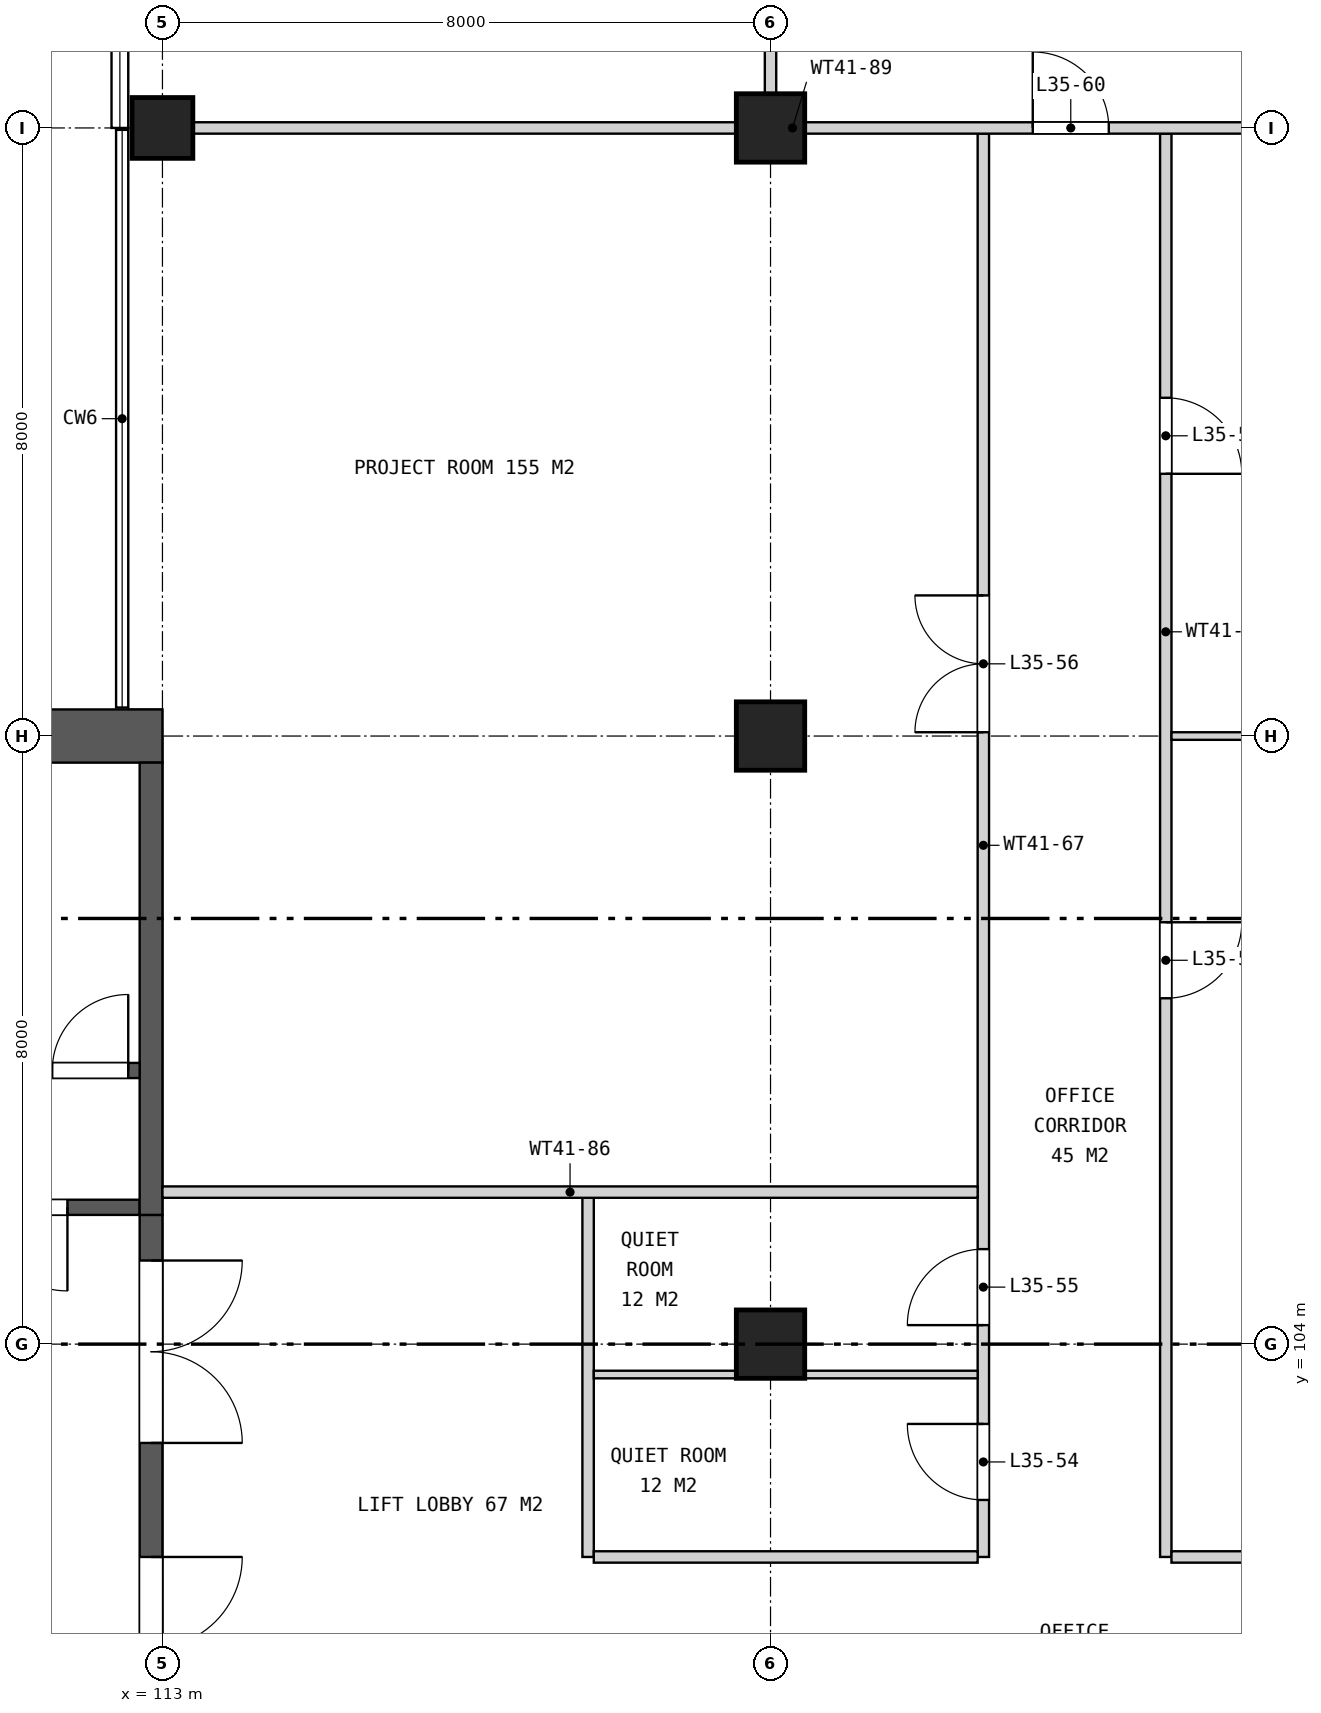
"""IFC4 building model, lengths in metres.
Left out: names, types, materials, properties, quantities, classifications, styles, units other than length and angle.
Written with IfcOpenShell. Run it as: python <this file> out.ifc"""

import sys

from ifc_helpers import new_model, si_unit, direction, frame, frame_2d, origin, origin_2d, place, context, subcontext, project, spatial, rectangle, extrude, element, fill, save


model = new_model("IFC4")
c1 = context("Model", 3, precision=1e-05, world=origin(), true_north=direction((0.0, 1.0)))
c2 = subcontext(c1, "Body", "Model", "MODEL_VIEW")
j1 = project(units=[si_unit("LENGTHUNIT", "METRE"), si_unit("PLANEANGLEUNIT", "RADIAN")], contexts=[c1])
p1 = place(None, origin())
s1 = spatial("IfcSite", under=j1, at=p1, CompositionType="ELEMENT")
p2 = place(p1, origin())
s2 = spatial("IfcBuilding", under=s1, at=p2, CompositionType="ELEMENT")
p3 = place(p2, frame((0.0, 0.0, 167.3)))
s3 = spatial("IfcBuildingStorey", under=s2, at=p3, CompositionType="ELEMENT", Elevation=167.3)
p4 = place(p3, frame((113.0, 120.0, 0.0), z_axis=(0.0, 0.0, 1.0), x_axis=(1.0, 0.0, 0.0)))
e1 = element("IfcColumn", 1, at=p4, inside=s3, PredefinedType="COLUMN", context=c2, shape_type="SweptSolid", body=[
    extrude(rectangle(XDim=0.8, YDim=0.8, at=origin_2d()), origin(), (0.0, 0.0, 1.0), 4.2),
])
for number, where, z_axis, x_axis in (
    (2, (121.0, 104.0, 0.0), (0.0, 0.0, 1.0), (1.0, 0.0, 0.0)),
    (3, (121.0, 112.0, 0.0), (0.0, 0.0, 1.0), (1.0, 0.0, 0.0)),
    (4, (121.0, 120.0, 0.0), (0.0, 0.0, 1.0), (1.0, 0.0, 0.0)),
):
    element("IfcColumn", number, at=place(p3, frame(where, z_axis=z_axis, x_axis=x_axis)), inside=s3, PredefinedType="COLUMN", context=c2, shape_type="SweptSolid", body=[
        extrude(rectangle(XDim=0.9, YDim=0.9, at=origin_2d()), origin(), (0.0, 0.0, 1.0), 4.2),
    ])
p5 = place(p3, frame((113.0, 112.0, 0.0), z_axis=(0.0, 0.0, 1.0), x_axis=(-1.0, 0.0, 0.0)))
e5 = element("IfcWall", 5, at=p5, inside=s3, PredefinedType="SHEAR", context=c2, shape_type="SweptSolid", body=[
    extrude(rectangle(XDim=7.1, YDim=0.7, at=frame_2d((3.55, 0.0))), origin(), (0.0, 0.0, 1.0), 4.2),
])
p6 = place(p3, frame((112.85, 105.7, 0.0), z_axis=(0.0, 0.0, 1.0), x_axis=(0.0, -1.0, 0.0)))
e6 = element("IfcWall", 6, at=p6, inside=s3, PredefinedType="SHEAR", context=c2, shape_type="SweptSolid", body=[
    extrude(rectangle(XDim=11.4, YDim=0.3, at=frame_2d((5.7, 0.0))), origin(), (0.0, 0.0, 1.0), 4.2),
])
p7 = place(p6, frame((0.6, 0.0, 0.0)))
e7 = element("IfcOpeningElement", 7, at=p7, cuts=e6, PredefinedType="OPENING", context=c2, shape_type="SweptSolid", body=[
    extrude(rectangle(XDim=2.4, YDim=2.4, at=frame_2d((1.2, 1.2))), frame((0.0, 0.16, 0.0), z_axis=(0.0, -1.0, 0.0), x_axis=(1.0, 0.0, 0.0)), (0.0, 0.0, 1.0), 0.32),
])
p8 = place(p6, frame((4.5, 0.0, 0.0)))
e8 = element("IfcOpeningElement", 8, at=p8, cuts=e6, PredefinedType="OPENING", context=c2, shape_type="SweptSolid", body=[
    extrude(rectangle(XDim=2.4, YDim=2.4, at=frame_2d((1.2, 1.2))), frame((0.0, 0.16, 0.0), z_axis=(0.0, -1.0, 0.0), x_axis=(1.0, 0.0, 0.0)), (0.0, 0.0, 1.0), 0.32),
])
p9 = place(p6, frame((8.4, 0.0, 0.0)))
e9 = element("IfcOpeningElement", 9, at=p9, cuts=e6, PredefinedType="OPENING", context=c2, shape_type="SweptSolid", body=[
    extrude(rectangle(XDim=2.4, YDim=2.4, at=frame_2d((1.2, 1.2))), frame((0.0, 0.16, 0.0), z_axis=(0.0, -1.0, 0.0), x_axis=(1.0, 0.0, 0.0)), (0.0, 0.0, 1.0), 0.32),
])
p10 = place(p3, frame((112.7, 105.8, 0.0), z_axis=(0.0, 0.0, 1.0), x_axis=(-1.0, 0.0, 0.0)))
e10 = element("IfcWall", 10, at=p10, inside=s3, PredefinedType="SHEAR", context=c2, shape_type="SweptSolid", body=[
    extrude(rectangle(XDim=15.35, YDim=0.2, at=frame_2d((7.675, 0.0))), origin(), (0.0, 0.0, 1.0), 4.2),
])
p11 = place(p10, frame((0.95, 0.0, 0.0)))
e11 = element("IfcOpeningElement", 11, at=p11, cuts=e10, PredefinedType="OPENING", context=c2, shape_type="SweptSolid", body=[
    extrude(rectangle(XDim=1.1, YDim=2.1, at=frame_2d((0.55, 1.05))), frame((0.0, 0.11, 0.0), z_axis=(0.0, -1.0, 0.0), x_axis=(1.0, 0.0, 0.0)), (0.0, 0.0, 1.0), 0.22),
])
p12 = place(p3, frame((112.85, 111.65, 0.0), z_axis=(0.0, 0.0, 1.0), x_axis=(0.0, -1.0, 0.0)))
e12 = element("IfcWall", 12, at=p12, inside=s3, PredefinedType="SHEAR", context=c2, shape_type="SweptSolid", body=[
    extrude(rectangle(XDim=5.95, YDim=0.3, at=frame_2d((2.975, 0.0))), origin(), (0.0, 0.0, 1.0), 4.2),
])
p13 = place(p3, frame((112.7, 107.6, 0.0), z_axis=(0.0, 0.0, 1.0), x_axis=(-1.0, 0.0, 0.0)))
e13 = element("IfcWall", 13, at=p13, inside=s3, PredefinedType="SHEAR", context=c2, shape_type="SweptSolid", body=[
    extrude(rectangle(XDim=6.8, YDim=0.2, at=frame_2d((3.4, 0.0))), origin(), (0.0, 0.0, 1.0), 4.2),
])
p14 = place(p13, frame((0.15, 0.0, 0.0)))
e14 = element("IfcOpeningElement", 14, at=p14, cuts=e13, PredefinedType="OPENING", context=c2, shape_type="SweptSolid", body=[
    extrude(rectangle(XDim=1.0, YDim=2.1, at=frame_2d((0.5, 1.05))), frame((0.0, 0.11, 0.0), z_axis=(0.0, -1.0, 0.0), x_axis=(1.0, 0.0, 0.0)), (0.0, 0.0, 1.0), 0.22),
])
p15 = place(p3, frame((118.6, 101.2, 0.0), z_axis=(0.0, 0.0, 1.0), x_axis=(0.0, 1.0, 0.0)))
e15 = element("IfcWall", 15, at=p15, inside=s3, PredefinedType="PARTITIONING", context=c2, shape_type="SweptSolid", body=[
    extrude(rectangle(XDim=4.725, YDim=0.15, at=frame_2d((2.363, 0.0))), origin(), (0.0, 0.0, 1.0), 3.26),
])
p16 = place(p3, frame((121.0, 120.075, 0.0), z_axis=(0.0, 0.0, 1.0), x_axis=(0.0, 1.0, 0.0)))
e16 = element("IfcWall", 16, at=p16, inside=s3, PredefinedType="PARTITIONING", context=c2, shape_type="SweptSolid", body=[
    extrude(rectangle(XDim=8.295, YDim=0.15, at=frame_2d((4.147, 0.0))), origin(), (0.0, 0.0, 1.0), 3.26),
])
p17 = place(p16, frame((3.55, 0.0, 0.0)))
e17 = element("IfcOpeningElement", 17, at=p17, cuts=e16, PredefinedType="OPENING", context=c2, shape_type="SweptSolid", body=[
    extrude(rectangle(XDim=0.9, YDim=2.1, at=frame_2d((0.45, 1.05))), frame((0.0, 0.085, 0.0), z_axis=(0.0, -1.0, 0.0), x_axis=(1.0, 0.0, 0.0)), (0.0, 0.0, 1.0), 0.17),
])
p18 = place(p3, frame((123.8, 101.2, 0.0), z_axis=(0.0, 0.0, 1.0), x_axis=(0.0, 1.0, 0.0)))
e18 = element("IfcWall", 18, at=p18, inside=s3, PredefinedType="PARTITIONING", context=c2, shape_type="SweptSolid", body=[
    extrude(rectangle(XDim=18.725, YDim=0.15, at=frame_2d((9.363, 0.0))), origin(), (0.0, 0.0, 1.0), 3.26),
])
p19 = place(p18, frame((0.75, 0.0, 0.0)))
e19 = element("IfcOpeningElement", 19, at=p19, cuts=e18, PredefinedType="OPENING", context=c2, shape_type="SweptSolid", body=[
    extrude(rectangle(XDim=1.0, YDim=2.1, at=frame_2d((0.5, 1.05))), frame((0.0, 0.085, 0.0), z_axis=(0.0, -1.0, 0.0), x_axis=(1.0, 0.0, 0.0)), (0.0, 0.0, 1.0), 0.17),
])
p20 = place(p18, frame((3.05, 0.0, 0.0)))
e20 = element("IfcOpeningElement", 20, at=p20, cuts=e18, PredefinedType="OPENING", context=c2, shape_type="SweptSolid", body=[
    extrude(rectangle(XDim=1.0, YDim=2.1, at=frame_2d((0.5, 1.05))), frame((0.0, 0.085, 0.0), z_axis=(0.0, -1.0, 0.0), x_axis=(1.0, 0.0, 0.0)), (0.0, 0.0, 1.0), 0.17),
])
p21 = place(p18, frame((10.85, 0.0, 0.0)))
e21 = element("IfcOpeningElement", 21, at=p21, cuts=e18, PredefinedType="OPENING", context=c2, shape_type="SweptSolid", body=[
    extrude(rectangle(XDim=1.8, YDim=2.1, at=frame_2d((0.9, 1.05))), frame((0.0, 0.085, 0.0), z_axis=(0.0, -1.0, 0.0), x_axis=(1.0, 0.0, 0.0)), (0.0, 0.0, 1.0), 0.17),
])
p22 = place(p3, frame((126.2, 101.2, 0.0), z_axis=(0.0, 0.0, 1.0), x_axis=(0.0, 1.0, 0.0)))
e22 = element("IfcWall", 22, at=p22, inside=s3, PredefinedType="PARTITIONING", context=c2, shape_type="SweptSolid", body=[
    extrude(rectangle(XDim=18.725, YDim=0.15, at=frame_2d((9.363, 0.0))), origin(), (0.0, 0.0, 1.0), 3.26),
])
p23 = place(p22, frame((7.35, 0.0, 0.0)))
e23 = element("IfcOpeningElement", 23, at=p23, cuts=e22, PredefinedType="OPENING", context=c2, shape_type="SweptSolid", body=[
    extrude(rectangle(XDim=1.0, YDim=2.1, at=frame_2d((0.5, 1.05))), frame((0.0, 0.085, 0.0), z_axis=(0.0, -1.0, 0.0), x_axis=(1.0, 0.0, 0.0)), (0.0, 0.0, 1.0), 0.17),
])
p24 = place(p22, frame((14.25, 0.0, 0.0)))
e24 = element("IfcOpeningElement", 24, at=p24, cuts=e22, PredefinedType="OPENING", context=c2, shape_type="SweptSolid", body=[
    extrude(rectangle(XDim=1.0, YDim=2.1, at=frame_2d((0.5, 1.05))), frame((0.0, 0.085, 0.0), z_axis=(0.0, -1.0, 0.0), x_axis=(1.0, 0.0, 0.0)), (0.0, 0.0, 1.0), 0.17),
])
for number, where, z_axis, x_axis in (
    (25, (118.675, 101.2, 0.0), (0.0, 0.0, 1.0), (1.0, 0.0, 0.0)),
    (26, (126.275, 101.2, 0.0), (0.0, 0.0, 1.0), (1.0, 0.0, 0.0)),
):
    element("IfcWall", number, at=place(p3, frame(where, z_axis=z_axis, x_axis=x_axis)), inside=s3, PredefinedType="PARTITIONING", context=c2, shape_type="SweptSolid", body=[
        extrude(rectangle(XDim=5.05, YDim=0.15, at=frame_2d((2.525, 0.0))), origin(), (0.0, 0.0, 1.0), 3.26),
    ])
p25 = place(p3, frame((118.675, 103.6, 0.0), z_axis=(0.0, 0.0, 1.0), x_axis=(1.0, 0.0, 0.0)))
e27 = element("IfcWall", 27, at=p25, inside=s3, PredefinedType="PARTITIONING", context=c2, shape_type="SweptSolid", body=[
    extrude(rectangle(XDim=5.05, YDim=0.1, at=frame_2d((2.525, 0.0))), origin(), (0.0, 0.0, 1.0), 3.26),
])
p26 = place(p3, frame((113.0, 106.0, 0.0), z_axis=(0.0, 0.0, 1.0), x_axis=(1.0, 0.0, 0.0)))
e28 = element("IfcWall", 28, at=p26, inside=s3, PredefinedType="PARTITIONING", context=c2, shape_type="SweptSolid", body=[
    extrude(rectangle(XDim=10.725, YDim=0.15, at=frame_2d((5.363, 0.0))), origin(), (0.0, 0.0, 1.0), 3.26),
])
p27 = place(p3, frame((126.275, 112.0, 0.0), z_axis=(0.0, 0.0, 1.0), x_axis=(1.0, 0.0, 0.0)))
e29 = element("IfcWall", 29, at=p27, inside=s3, PredefinedType="PARTITIONING", context=c2, shape_type="SweptSolid", body=[
    extrude(rectangle(XDim=10.725, YDim=0.1, at=frame_2d((5.363, 0.0))), origin(), (0.0, 0.0, 1.0), 3.26),
])
p28 = place(p3, frame((112.63, 120.0, 0.0), z_axis=(0.0, 0.0, 1.0), x_axis=(1.0, 0.0, 0.0)))
e30 = element("IfcWall", 30, at=p28, inside=s3, PredefinedType="PARTITIONING", context=c2, shape_type="SweptSolid", body=[
    extrude(rectangle(XDim=24.74, YDim=0.15, at=frame_2d((12.37, 0.0))), origin(), (0.0, 0.0, 1.0), 3.26),
])
p29 = place(p28, frame((11.82, 0.0, 0.0)))
e31 = element("IfcOpeningElement", 31, at=p29, cuts=e30, PredefinedType="OPENING", context=c2, shape_type="SweptSolid", body=[
    extrude(rectangle(XDim=1.0, YDim=2.1, at=frame_2d((0.5, 1.05))), frame((0.0, 0.085, 0.0), z_axis=(0.0, -1.0, 0.0), x_axis=(1.0, 0.0, 0.0)), (0.0, 0.0, 1.0), 0.17),
])
p30 = place(p7, origin())
e32 = element("IfcDoor", 32, at=p30, inside=s3, OperationType="DOUBLE_DOOR_SINGLE_SWING", PredefinedType="DOOR", context=c2, shape_type="SweptSolid", body=[
    extrude(rectangle(XDim=2.4, YDim=2.4, at=frame_2d((1.2, 1.2))), frame((0.0, 0.025, 0.0), z_axis=(0.0, -1.0, 0.0), x_axis=(1.0, 0.0, 0.0)), (0.0, 0.0, 1.0), 0.05),
])
fill(e7, e32)
p31 = place(p8, origin())
e33 = element("IfcDoor", 33, at=p31, inside=s3, OperationType="DOUBLE_DOOR_SINGLE_SWING", PredefinedType="DOOR", context=c2, shape_type="SweptSolid", body=[
    extrude(rectangle(XDim=2.4, YDim=2.4, at=frame_2d((1.2, 1.2))), frame((0.0, 0.025, 0.0), z_axis=(0.0, -1.0, 0.0), x_axis=(1.0, 0.0, 0.0)), (0.0, 0.0, 1.0), 0.05),
])
fill(e8, e33)
p32 = place(p11, origin())
e34 = element("IfcDoor", 34, at=p32, inside=s3, OperationType="SINGLE_SWING_LEFT", PredefinedType="DOOR", context=c2, shape_type="SweptSolid", body=[
    extrude(rectangle(XDim=1.1, YDim=2.1, at=frame_2d((0.55, 1.05))), frame((0.0, 0.025, 0.0), z_axis=(0.0, -1.0, 0.0), x_axis=(1.0, 0.0, 0.0)), (0.0, 0.0, 1.0), 0.05),
])
fill(e11, e34)
p33 = place(p14, frame((1.0, 0.0, 0.0), z_axis=(0.0, 0.0, 1.0), x_axis=(-1.0, 0.0, 0.0)))
e35 = element("IfcDoor", 35, at=p33, inside=s3, OperationType="SINGLE_SWING_RIGHT", PredefinedType="DOOR", context=c2, shape_type="SweptSolid", body=[
    extrude(rectangle(XDim=1.0, YDim=2.1, at=frame_2d((0.5, 1.05))), frame((0.0, 0.025, 0.0), z_axis=(0.0, -1.0, 0.0), x_axis=(1.0, 0.0, 0.0)), (0.0, 0.0, 1.0), 0.05),
])
fill(e14, e35)
p34 = place(p23, frame((1.0, 0.0, 0.0), z_axis=(0.0, 0.0, 1.0), x_axis=(-1.0, 0.0, 0.0)))
e36 = element("IfcDoor", 36, at=p34, inside=s3, OperationType="SINGLE_SWING_LEFT", PredefinedType="DOOR", context=c2, shape_type="SweptSolid", body=[
    extrude(rectangle(XDim=1.0, YDim=2.1, at=frame_2d((0.5, 1.05))), frame((0.0, 0.025, 0.0), z_axis=(0.0, -1.0, 0.0), x_axis=(1.0, 0.0, 0.0)), (0.0, 0.0, 1.0), 0.05),
])
fill(e23, e36)
p35 = place(p24, frame((1.0, 0.0, 0.0), z_axis=(0.0, 0.0, 1.0), x_axis=(-1.0, 0.0, 0.0)))
e37 = element("IfcDoor", 37, at=p35, inside=s3, OperationType="SINGLE_SWING_RIGHT", PredefinedType="DOOR", context=c2, shape_type="SweptSolid", body=[
    extrude(rectangle(XDim=1.0, YDim=2.1, at=frame_2d((0.5, 1.05))), frame((0.0, 0.025, 0.0), z_axis=(0.0, -1.0, 0.0), x_axis=(1.0, 0.0, 0.0)), (0.0, 0.0, 1.0), 0.05),
])
fill(e24, e37)
p36 = place(p19, origin())
e38 = element("IfcDoor", 38, at=p36, inside=s3, OperationType="SINGLE_SWING_RIGHT", PredefinedType="DOOR", context=c2, shape_type="SweptSolid", body=[
    extrude(rectangle(XDim=1.0, YDim=2.1, at=frame_2d((0.5, 1.05))), frame((0.0, 0.025, 0.0), z_axis=(0.0, -1.0, 0.0), x_axis=(1.0, 0.0, 0.0)), (0.0, 0.0, 1.0), 0.05),
])
fill(e19, e38)
p37 = place(p20, origin())
e39 = element("IfcDoor", 39, at=p37, inside=s3, OperationType="SINGLE_SWING_LEFT", PredefinedType="DOOR", context=c2, shape_type="SweptSolid", body=[
    extrude(rectangle(XDim=1.0, YDim=2.1, at=frame_2d((0.5, 1.05))), frame((0.0, 0.025, 0.0), z_axis=(0.0, -1.0, 0.0), x_axis=(1.0, 0.0, 0.0)), (0.0, 0.0, 1.0), 0.05),
])
fill(e20, e39)
p38 = place(p21, origin())
e40 = element("IfcDoor", 40, at=p38, inside=s3, OperationType="DOUBLE_DOOR_SINGLE_SWING", PredefinedType="DOOR", context=c2, shape_type="SweptSolid", body=[
    extrude(rectangle(XDim=1.8, YDim=2.1, at=frame_2d((0.9, 1.05))), frame((0.0, 0.025, 0.0), z_axis=(0.0, -1.0, 0.0), x_axis=(1.0, 0.0, 0.0)), (0.0, 0.0, 1.0), 0.05),
])
fill(e21, e40)
p39 = place(p29, origin())
e41 = element("IfcDoor", 41, at=p39, inside=s3, OperationType="SINGLE_SWING_LEFT", PredefinedType="DOOR", context=c2, shape_type="SweptSolid", body=[
    extrude(rectangle(XDim=1.0, YDim=2.1, at=frame_2d((0.5, 1.05))), frame((0.0, 0.025, 0.0), z_axis=(0.0, -1.0, 0.0), x_axis=(1.0, 0.0, 0.0)), (0.0, 0.0, 1.0), 0.05),
])
fill(e31, e41)
save(model, sys.argv[1])
